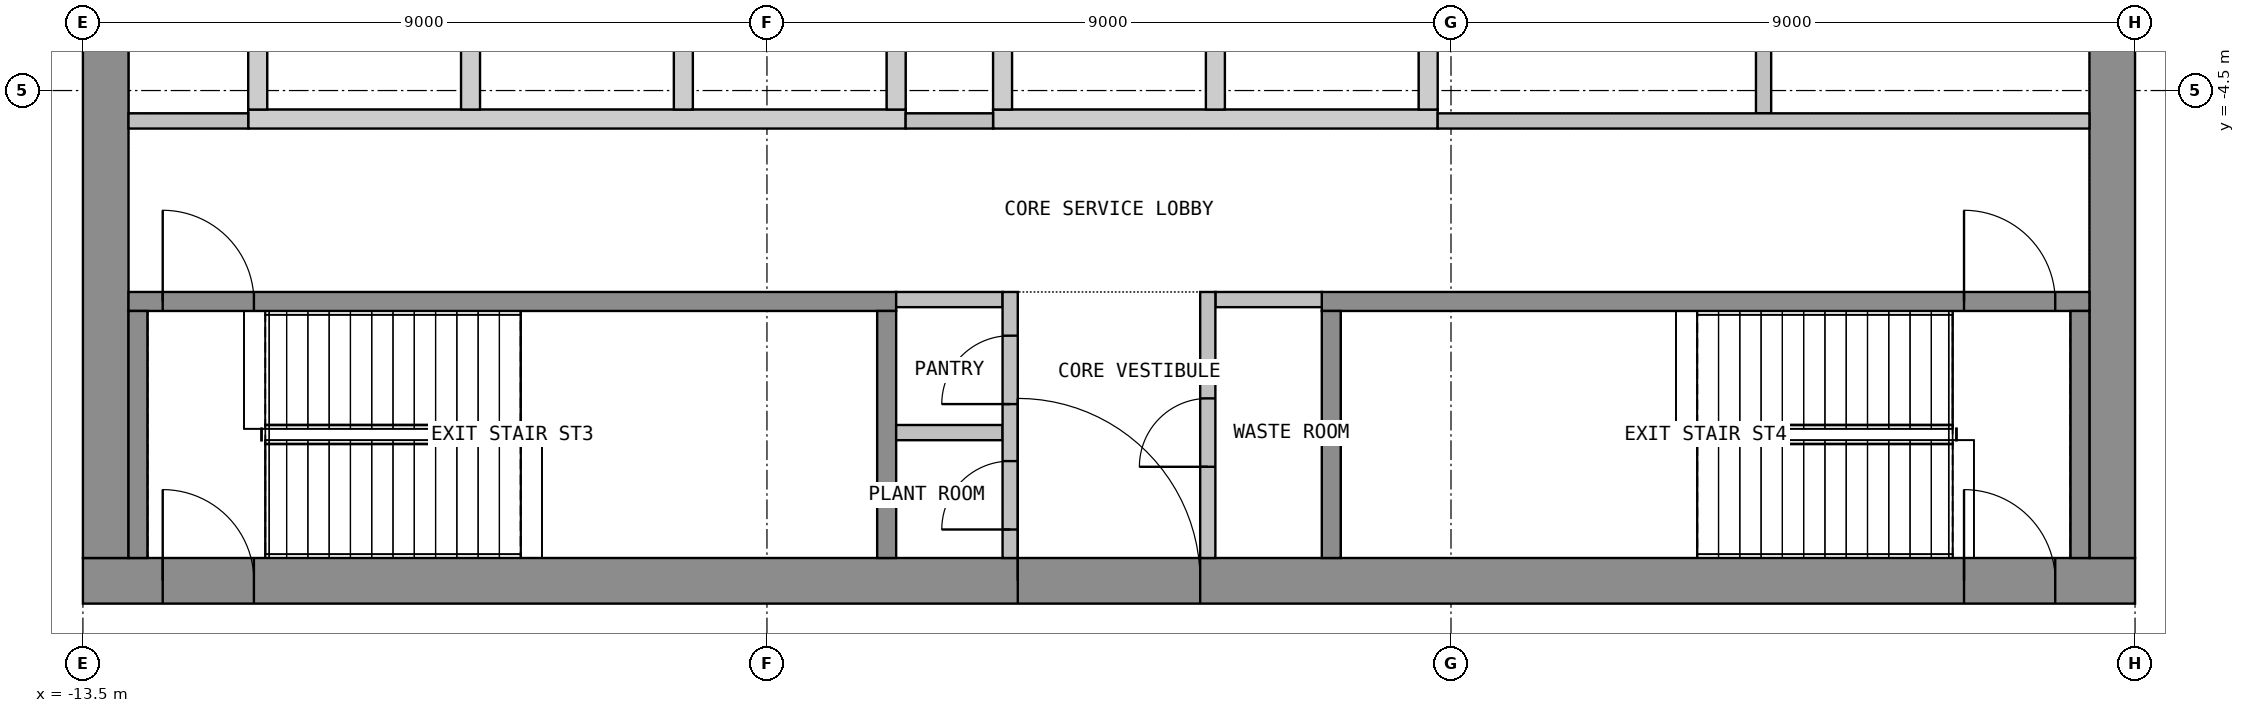
"""IFC4 building model, lengths in metres.
Left out: names, types, materials, properties, quantities, classifications, styles, units other than length and angle.
Written with IfcOpenShell. Run it as: python <this file> out.ifc"""

import sys

from ifc_helpers import new_model, si_unit, direction, frame, frame_2d, origin, place, context, subcontext, project, spatial, polyline, rectangle, outline, extrude, element, fill, save


model = new_model("IFC4")
c1 = context("Model", 3, precision=1e-05, world=origin(), true_north=direction((0.0, 1.0)))
c2 = subcontext(c1, "Body", "Model", "MODEL_VIEW")
j1 = project(units=[si_unit("LENGTHUNIT", "METRE"), si_unit("PLANEANGLEUNIT", "RADIAN")], contexts=[c1])
p1 = place(None, origin())
s1 = spatial("IfcSite", under=j1, at=p1, CompositionType="ELEMENT")
p2 = place(p1, origin())
s2 = spatial("IfcBuilding", under=s1, at=p2, CompositionType="ELEMENT")
p3 = place(p2, frame((0.0, 0.0, 309.9)))
s3 = spatial("IfcBuildingStorey", under=s2, at=p3, CompositionType="ELEMENT", Elevation=309.9)
p4 = place(p3, frame((-13.5, -10.95, 0.0), z_axis=(0.0, 0.0, 1.0), x_axis=(1.0, 0.0, 0.0)))
e1 = element("IfcWall", 1, at=p4, inside=s3, PredefinedType="SHEAR", context=c2, shape_type="SweptSolid", body=[
    extrude(rectangle(XDim=27.0, YDim=0.6, at=frame_2d((13.5, 0.0))), origin(), (0.0, 0.0, 1.0), 8.55),
])
p5 = place(p4, frame((12.3, 0.0, 0.0)))
e2 = element("IfcOpeningElement", 2, at=p5, cuts=e1, PredefinedType="OPENING", context=c2, shape_type="SweptSolid", body=[
    extrude(rectangle(XDim=2.4, YDim=2.1, at=frame_2d((1.2, 1.05))), frame((0.0, 0.31, 0.0), z_axis=(0.0, -1.0, 0.0), x_axis=(1.0, 0.0, 0.0)), (0.0, 0.0, 1.0), 0.62),
])
p6 = place(p4, frame((1.05, 0.0, 0.0)))
e3 = element("IfcOpeningElement", 3, at=p6, cuts=e1, PredefinedType="OPENING", context=c2, shape_type="SweptSolid", body=[
    extrude(rectangle(XDim=1.2, YDim=2.1, at=frame_2d((0.6, 1.05))), frame((0.0, 0.31, 0.0), z_axis=(0.0, -1.0, 0.0), x_axis=(1.0, 0.0, 0.0)), (0.0, 0.0, 1.0), 0.62),
])
p7 = place(p4, frame((24.75, 0.0, 0.0)))
e4 = element("IfcOpeningElement", 4, at=p7, cuts=e1, PredefinedType="OPENING", context=c2, shape_type="SweptSolid", body=[
    extrude(rectangle(XDim=1.2, YDim=2.1, at=frame_2d((0.6, 1.05))), frame((0.0, 0.31, 0.0), z_axis=(0.0, -1.0, 0.0), x_axis=(1.0, 0.0, 0.0)), (0.0, 0.0, 1.0), 0.62),
])
p8 = place(p3, frame((-13.2, -10.65, 0.0), z_axis=(0.0, 0.0, 1.0), x_axis=(0.0, 1.0, 0.0)))
e5 = element("IfcWall", 5, at=p8, inside=s3, PredefinedType="SHEAR", context=c2, shape_type="SweptSolid", body=[
    extrude(rectangle(XDim=21.3, YDim=0.6, at=frame_2d((10.65, 0.0))), origin(), (0.0, 0.0, 1.0), 8.55),
])
p9 = place(p8, frame((9.45, 0.0, 0.0)))
e6 = element("IfcOpeningElement", 6, at=p9, cuts=e5, PredefinedType="OPENING", context=c2, shape_type="SweptSolid", body=[
    extrude(rectangle(XDim=2.4, YDim=2.1, at=frame_2d((1.2, 1.05))), frame((0.0, 0.31, 0.0), z_axis=(0.0, -1.0, 0.0), x_axis=(1.0, 0.0, 0.0)), (0.0, 0.0, 1.0), 0.62),
])
p10 = place(p3, frame((13.2, -10.65, 0.0), z_axis=(0.0, 0.0, 1.0), x_axis=(0.0, 1.0, 0.0)))
e7 = element("IfcWall", 7, at=p10, inside=s3, PredefinedType="SHEAR", context=c2, shape_type="SweptSolid", body=[
    extrude(rectangle(XDim=21.3, YDim=0.6, at=frame_2d((10.65, 0.0))), origin(), (0.0, 0.0, 1.0), 8.55),
])
p11 = place(p10, frame((9.45, 0.0, 0.0)))
e8 = element("IfcOpeningElement", 8, at=p11, cuts=e7, PredefinedType="OPENING", context=c2, shape_type="SweptSolid", body=[
    extrude(rectangle(XDim=2.4, YDim=2.1, at=frame_2d((1.2, 1.05))), frame((0.0, 0.31, 0.0), z_axis=(0.0, -1.0, 0.0), x_axis=(1.0, 0.0, 0.0)), (0.0, 0.0, 1.0), 0.62),
])
p12 = place(p3, origin())
e9 = element("IfcWall", 9, at=p12, inside=s3, PredefinedType="SHEAR", context=c2, shape_type="SweptSolid", body=[
    extrude(outline(polyline([(-11.325, -5.0), (-2.675, -5.0), (-2.675, -4.75), (-11.325, -4.75), (-11.325, -5.0)])), origin(), (0.0, 0.0, 1.0), 8.55),
])
p13 = place(p3, origin())
e10 = element("IfcWall", 10, at=p13, inside=s3, PredefinedType="SHEAR", context=c2, shape_type="SweptSolid", body=[
    extrude(outline(polyline([(-1.525, -5.0), (4.325, -5.0), (4.325, -4.75), (-1.525, -4.75), (-1.525, -5.0)])), origin(), (0.0, 0.0, 1.0), 8.55),
])
p14 = place(p3, origin())
e11 = element("IfcWall", 11, at=p14, inside=s3, PredefinedType="SHEAR", context=c2, shape_type="SweptSolid", body=[
    extrude(outline(polyline([(-11.325, -4.75), (-11.075, -4.75), (-11.075, -2.05), (-11.325, -2.05), (-11.325, -4.75)])), origin(), (0.0, 0.0, 1.0), 8.55),
])
p15 = place(p3, origin())
e12 = element("IfcWall", 12, at=p15, inside=s3, PredefinedType="SHEAR", context=c2, shape_type="SweptSolid", body=[
    extrude(outline(polyline([(-8.525, -4.75), (-8.275, -4.75), (-8.275, -2.05), (-8.525, -2.05), (-8.525, -4.75)])), origin(), (0.0, 0.0, 1.0), 8.55),
])
p16 = place(p3, origin())
e13 = element("IfcWall", 13, at=p16, inside=s3, PredefinedType="SHEAR", context=c2, shape_type="SweptSolid", body=[
    extrude(outline(polyline([(-5.725, -4.75), (-5.475, -4.75), (-5.475, -2.05), (-5.725, -2.05), (-5.725, -4.75)])), origin(), (0.0, 0.0, 1.0), 8.55),
])
p17 = place(p3, origin())
e14 = element("IfcWall", 14, at=p17, inside=s3, PredefinedType="SHEAR", context=c2, shape_type="SweptSolid", body=[
    extrude(outline(polyline([(-2.925, -4.75), (-2.675, -4.75), (-2.675, -2.05), (-2.925, -2.05), (-2.925, -4.75)])), origin(), (0.0, 0.0, 1.0), 8.55),
])
p18 = place(p3, origin())
e15 = element("IfcWall", 15, at=p18, inside=s3, PredefinedType="SHEAR", context=c2, shape_type="SweptSolid", body=[
    extrude(outline(polyline([(-1.525, -4.75), (-1.275, -4.75), (-1.275, -2.05), (-1.525, -2.05), (-1.525, -4.75)])), origin(), (0.0, 0.0, 1.0), 8.55),
])
p19 = place(p3, origin())
e16 = element("IfcWall", 16, at=p19, inside=s3, PredefinedType="SHEAR", context=c2, shape_type="SweptSolid", body=[
    extrude(outline(polyline([(1.275, -4.75), (1.525, -4.75), (1.525, -2.05), (1.275, -2.05), (1.275, -4.75)])), origin(), (0.0, 0.0, 1.0), 8.55),
])
p20 = place(p3, origin())
e17 = element("IfcWall", 17, at=p20, inside=s3, PredefinedType="SHEAR", context=c2, shape_type="SweptSolid", body=[
    extrude(outline(polyline([(4.075, -4.75), (4.325, -4.75), (4.325, -2.05), (4.075, -2.05), (4.075, -4.75)])), origin(), (0.0, 0.0, 1.0), 8.55),
])
p21 = place(p3, frame((-12.9, -7.275, 0.0), z_axis=(0.0, 0.0, 1.0), x_axis=(1.0, 0.0, 0.0)))
e18 = element("IfcWall", 18, at=p21, inside=s3, PredefinedType="SHEAR", context=c2, shape_type="SweptSolid", body=[
    extrude(rectangle(XDim=10.1, YDim=0.25, at=frame_2d((5.05, 0.0))), origin(), (0.0, 0.0, 1.0), 8.55),
])
p22 = place(p21, frame((0.45, 0.0, 0.0)))
e19 = element("IfcOpeningElement", 19, at=p22, cuts=e18, PredefinedType="OPENING", context=c2, shape_type="SweptSolid", body=[
    extrude(rectangle(XDim=1.2, YDim=2.1, at=frame_2d((0.6, 1.05))), frame((0.0, 0.135, 0.0), z_axis=(0.0, -1.0, 0.0), x_axis=(1.0, 0.0, 0.0)), (0.0, 0.0, 1.0), 0.27),
])
for number, where, z_axis, x_axis in (
    (20, (-12.775, -10.65, 0.0), (0.0, 0.0, 1.0), (0.0, 1.0, 0.0)),
    (21, (-2.925, -10.65, 0.0), (0.0, 0.0, 1.0), (0.0, 1.0, 0.0)),
):
    element("IfcWall", number, at=place(p3, frame(where, z_axis=z_axis, x_axis=x_axis)), inside=s3, PredefinedType="SHEAR", context=c2, shape_type="SweptSolid", body=[
        extrude(rectangle(XDim=3.25, YDim=0.25, at=frame_2d((1.625, 0.0))), origin(), (0.0, 0.0, 1.0), 8.55),
    ])
p23 = place(p3, frame((2.8, -7.275, 0.0), z_axis=(0.0, 0.0, 1.0), x_axis=(1.0, 0.0, 0.0)))
e22 = element("IfcWall", 22, at=p23, inside=s3, PredefinedType="SHEAR", context=c2, shape_type="SweptSolid", body=[
    extrude(rectangle(XDim=10.1, YDim=0.25, at=frame_2d((5.05, 0.0))), origin(), (0.0, 0.0, 1.0), 8.55),
])
p24 = place(p23, frame((8.45, 0.0, 0.0)))
e23 = element("IfcOpeningElement", 23, at=p24, cuts=e22, PredefinedType="OPENING", context=c2, shape_type="SweptSolid", body=[
    extrude(rectangle(XDim=1.2, YDim=2.1, at=frame_2d((0.6, 1.05))), frame((0.0, 0.135, 0.0), z_axis=(0.0, -1.0, 0.0), x_axis=(1.0, 0.0, 0.0)), (0.0, 0.0, 1.0), 0.27),
])
for number, where, z_axis, x_axis in (
    (24, (2.925, -10.65, 0.0), (0.0, 0.0, 1.0), (0.0, 1.0, 0.0)),
    (25, (12.775, -10.65, 0.0), (0.0, 0.0, 1.0), (0.0, 1.0, 0.0)),
):
    element("IfcWall", number, at=place(p3, frame(where, z_axis=z_axis, x_axis=x_axis)), inside=s3, PredefinedType="SHEAR", context=c2, shape_type="SweptSolid", body=[
        extrude(rectangle(XDim=3.25, YDim=0.25, at=frame_2d((1.625, 0.0))), origin(), (0.0, 0.0, 1.0), 8.55),
    ])
for number, where, z_axis, x_axis in (
    (26, (-2.8, -7.25, 0.0), (0.0, 0.0, 1.0), (1.0, 0.0, 0.0)),
    (27, (-2.8, -9.0, 0.0), (0.0, 0.0, 1.0), (1.0, 0.0, 0.0)),
    (28, (1.4, -7.25, 0.0), (0.0, 0.0, 1.0), (1.0, 0.0, 0.0)),
):
    element("IfcWall", number, at=place(p3, frame(where, z_axis=z_axis, x_axis=x_axis)), inside=s3, PredefinedType="PARTITIONING", context=c2, shape_type="SweptSolid", body=[
        extrude(rectangle(XDim=1.4, YDim=0.2, at=frame_2d((0.7, 0.0))), origin(), (0.0, 0.0, 1.0), 8.55),
    ])
p25 = place(p3, frame((-1.3, -10.65, 0.0), z_axis=(0.0, 0.0, 1.0), x_axis=(0.0, 1.0, 0.0)))
e29 = element("IfcWall", 29, at=p25, inside=s3, PredefinedType="PARTITIONING", context=c2, shape_type="SweptSolid", body=[
    extrude(rectangle(XDim=3.5, YDim=0.2, at=frame_2d((1.75, 0.0))), origin(), (0.0, 0.0, 1.0), 8.55),
])
p26 = place(p25, frame((0.375, 0.0, 0.0)))
e30 = element("IfcOpeningElement", 30, at=p26, cuts=e29, PredefinedType="OPENING", context=c2, shape_type="SweptSolid", body=[
    extrude(rectangle(XDim=0.9, YDim=2.1, at=frame_2d((0.45, 1.05))), frame((0.0, 0.11, 0.0), z_axis=(0.0, -1.0, 0.0), x_axis=(1.0, 0.0, 0.0)), (0.0, 0.0, 1.0), 0.22),
])
p27 = place(p25, frame((2.025, 0.0, 0.0)))
e31 = element("IfcOpeningElement", 31, at=p27, cuts=e29, PredefinedType="OPENING", context=c2, shape_type="SweptSolid", body=[
    extrude(rectangle(XDim=0.9, YDim=2.1, at=frame_2d((0.45, 1.05))), frame((0.0, 0.11, 0.0), z_axis=(0.0, -1.0, 0.0), x_axis=(1.0, 0.0, 0.0)), (0.0, 0.0, 1.0), 0.22),
])
p28 = place(p3, frame((1.3, -10.65, 0.0), z_axis=(0.0, 0.0, 1.0), x_axis=(0.0, 1.0, 0.0)))
e32 = element("IfcWall", 32, at=p28, inside=s3, PredefinedType="PARTITIONING", context=c2, shape_type="SweptSolid", body=[
    extrude(rectangle(XDim=3.5, YDim=0.2, at=frame_2d((1.75, 0.0))), origin(), (0.0, 0.0, 1.0), 8.55),
])
p29 = place(p28, frame((1.2, 0.0, 0.0)))
e33 = element("IfcOpeningElement", 33, at=p29, cuts=e32, PredefinedType="OPENING", context=c2, shape_type="SweptSolid", body=[
    extrude(rectangle(XDim=0.9, YDim=2.1, at=frame_2d((0.45, 1.05))), frame((0.0, 0.11, 0.0), z_axis=(0.0, -1.0, 0.0), x_axis=(1.0, 0.0, 0.0)), (0.0, 0.0, 1.0), 0.22),
])
p30 = place(p3, frame((-12.9, -4.9, 0.0), z_axis=(0.0, 0.0, 1.0), x_axis=(1.0, 0.0, 0.0)))
e34 = element("IfcWall", 34, at=p30, inside=s3, PredefinedType="PARTITIONING", context=c2, shape_type="SweptSolid", body=[
    extrude(rectangle(XDim=1.575, YDim=0.2, at=frame_2d((0.788, 0.0))), origin(), (0.0, 0.0, 1.0), 8.55),
])
p31 = place(p3, frame((-2.675, -4.9, 0.0), z_axis=(0.0, 0.0, 1.0), x_axis=(1.0, 0.0, 0.0)))
e35 = element("IfcWall", 35, at=p31, inside=s3, PredefinedType="PARTITIONING", context=c2, shape_type="SweptSolid", body=[
    extrude(rectangle(XDim=1.15, YDim=0.2, at=frame_2d((0.575, 0.0))), origin(), (0.0, 0.0, 1.0), 8.55),
])
p32 = place(p3, frame((8.613, -4.8, 0.0), z_axis=(0.0, 0.0, 1.0), x_axis=(0.0, 1.0, 0.0)))
e36 = element("IfcWall", 36, at=p32, inside=s3, PredefinedType="PARTITIONING", context=c2, shape_type="SweptSolid", body=[
    extrude(rectangle(XDim=2.8, YDim=0.2, at=frame_2d((1.4, 0.0))), origin(), (0.0, 0.0, 1.0), 8.55),
])
p33 = place(p3, frame((4.325, -4.9, 0.0), z_axis=(0.0, 0.0, 1.0), x_axis=(1.0, 0.0, 0.0)))
e37 = element("IfcWall", 37, at=p33, inside=s3, PredefinedType="PARTITIONING", context=c2, shape_type="SweptSolid", body=[
    extrude(rectangle(XDim=8.575, YDim=0.2, at=frame_2d((4.288, 0.0))), origin(), (0.0, 0.0, 1.0), 8.55),
])
p34 = place(p5, origin())
e38 = element("IfcDoor", 38, at=p34, inside=s3, OperationType="DOUBLE_DOOR_DOUBLE_SWING", PredefinedType="DOOR", context=c2, shape_type="SweptSolid", body=[
    extrude(rectangle(XDim=2.4, YDim=2.1, at=frame_2d((1.2, 1.05))), frame((0.0, 0.025, 0.0), z_axis=(0.0, -1.0, 0.0), x_axis=(1.0, 0.0, 0.0)), (0.0, 0.0, 1.0), 0.05),
])
fill(e2, e38)
p35 = place(p6, origin())
e39 = element("IfcDoor", 39, at=p35, inside=s3, OperationType="SINGLE_SWING_RIGHT", PredefinedType="DOOR", context=c2, shape_type="SweptSolid", body=[
    extrude(rectangle(XDim=1.2, YDim=2.1, at=frame_2d((0.6, 1.05))), frame((0.0, 0.025, 0.0), z_axis=(0.0, -1.0, 0.0), x_axis=(1.0, 0.0, 0.0)), (0.0, 0.0, 1.0), 0.05),
])
fill(e3, e39)
p36 = place(p7, origin())
e40 = element("IfcDoor", 40, at=p36, inside=s3, OperationType="SINGLE_SWING_RIGHT", PredefinedType="DOOR", context=c2, shape_type="SweptSolid", body=[
    extrude(rectangle(XDim=1.2, YDim=2.1, at=frame_2d((0.6, 1.05))), frame((0.0, 0.025, 0.0), z_axis=(0.0, -1.0, 0.0), x_axis=(1.0, 0.0, 0.0)), (0.0, 0.0, 1.0), 0.05),
])
fill(e4, e40)
p37 = place(p22, origin())
e41 = element("IfcDoor", 41, at=p37, inside=s3, OperationType="SINGLE_SWING_LEFT", PredefinedType="DOOR", context=c2, shape_type="SweptSolid", body=[
    extrude(rectangle(XDim=1.2, YDim=2.1, at=frame_2d((0.6, 1.05))), frame((0.0, 0.025, 0.0), z_axis=(0.0, -1.0, 0.0), x_axis=(1.0, 0.0, 0.0)), (0.0, 0.0, 1.0), 0.05),
])
fill(e19, e41)
p38 = place(p24, origin())
e42 = element("IfcDoor", 42, at=p38, inside=s3, OperationType="SINGLE_SWING_LEFT", PredefinedType="DOOR", context=c2, shape_type="SweptSolid", body=[
    extrude(rectangle(XDim=1.2, YDim=2.1, at=frame_2d((0.6, 1.05))), frame((0.0, 0.025, 0.0), z_axis=(0.0, -1.0, 0.0), x_axis=(1.0, 0.0, 0.0)), (0.0, 0.0, 1.0), 0.05),
])
fill(e23, e42)
p39 = place(p26, origin())
e43 = element("IfcDoor", 43, at=p39, inside=s3, OperationType="SINGLE_SWING_LEFT", PredefinedType="DOOR", context=c2, shape_type="SweptSolid", body=[
    extrude(rectangle(XDim=0.9, YDim=2.1, at=frame_2d((0.45, 1.05))), frame((0.0, 0.025, 0.0), z_axis=(0.0, -1.0, 0.0), x_axis=(1.0, 0.0, 0.0)), (0.0, 0.0, 1.0), 0.05),
])
fill(e30, e43)
p40 = place(p27, origin())
e44 = element("IfcDoor", 44, at=p40, inside=s3, OperationType="SINGLE_SWING_LEFT", PredefinedType="DOOR", context=c2, shape_type="SweptSolid", body=[
    extrude(rectangle(XDim=0.9, YDim=2.1, at=frame_2d((0.45, 1.05))), frame((0.0, 0.025, 0.0), z_axis=(0.0, -1.0, 0.0), x_axis=(1.0, 0.0, 0.0)), (0.0, 0.0, 1.0), 0.05),
])
fill(e31, e44)
p41 = place(p29, origin())
e45 = element("IfcDoor", 45, at=p41, inside=s3, OperationType="SINGLE_SWING_LEFT", PredefinedType="DOOR", context=c2, shape_type="SweptSolid", body=[
    extrude(rectangle(XDim=0.9, YDim=2.1, at=frame_2d((0.45, 1.05))), frame((0.0, 0.025, 0.0), z_axis=(0.0, -1.0, 0.0), x_axis=(1.0, 0.0, 0.0)), (0.0, 0.0, 1.0), 0.05),
])
fill(e33, e45)
save(model, sys.argv[1])
